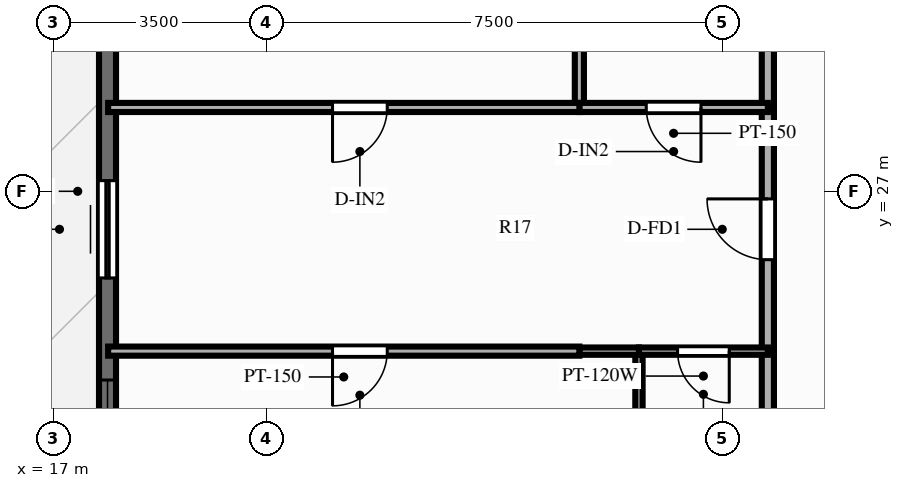
"""IFC4 building model, lengths in metres.
Left out: names, types, materials, properties, quantities, classifications, styles, units other than length and angle.
Written with IfcOpenShell. Run it as: python <this file> out.ifc"""

import sys

from ifc_helpers import new_model, si_unit, direction, frame, frame_2d, origin, place, context, subcontext, project, spatial, rectangle, extrude, source, transform, mapped, element, fill, save


model = new_model("IFC4")
c1 = context("Model", 3, precision=1e-05, world=origin(), true_north=direction((0.0, 1.0)))
c2 = subcontext(c1, "Body", "Model", "MODEL_VIEW")
j1 = project(units=[si_unit("LENGTHUNIT", "METRE"), si_unit("PLANEANGLEUNIT", "RADIAN")], contexts=[c1])
p1 = place(None, origin())
s1 = spatial("IfcSite", under=j1, at=p1, CompositionType="ELEMENT")
p2 = place(p1, origin())
s2 = spatial("IfcBuilding", under=s1, at=p2, CompositionType="ELEMENT")
p3 = place(p2, frame((0.0, 0.0, 172.9)))
s3 = spatial("IfcBuildingStorey", under=s2, at=p3, CompositionType="ELEMENT", Elevation=172.9)
p4 = place(p3, frame((17.89, 11.0, 0.0), z_axis=(0.0, 0.0, 1.0), x_axis=(0.0, 1.0, 0.0)))
e1 = element("IfcWall", 1, at=p4, inside=s3, PredefinedType="SOLIDWALL", context=c2, shape_type="SweptSolid", body=[
    extrude(rectangle(XDim=32.0, YDim=0.28, at=frame_2d((16.0, 0.0))), origin(), (0.0, 0.0, 1.0), 2.79),
])
p5 = place(p4, frame((0.685, 0.0, 0.85)))
e2 = element("IfcOpeningElement", 2, at=p5, cuts=e1, PredefinedType="OPENING", context=c2, shape_type="SweptSolid", body=[
    extrude(rectangle(XDim=1.8, YDim=1.65, at=frame_2d((0.9, 0.825))), frame((0.0, 0.152, 0.0), z_axis=(0.0, -1.0, 0.0), x_axis=(1.0, 0.0, 0.0)), (0.0, 0.0, 1.0), 0.304),
])
p6 = place(p4, frame((3.945, 0.0, 0.85)))
e3 = element("IfcOpeningElement", 3, at=p6, cuts=e1, PredefinedType="OPENING", context=c2, shape_type="SweptSolid", body=[
    extrude(rectangle(XDim=1.8, YDim=1.65, at=frame_2d((0.9, 0.825))), frame((0.0, 0.152, 0.0), z_axis=(0.0, -1.0, 0.0), x_axis=(1.0, 0.0, 0.0)), (0.0, 0.0, 1.0), 0.304),
])
p7 = place(p4, frame((8.051, 0.0, 0.85)))
e4 = element("IfcOpeningElement", 4, at=p7, cuts=e1, PredefinedType="OPENING", context=c2, shape_type="SweptSolid", body=[
    extrude(rectangle(XDim=1.8, YDim=1.65, at=frame_2d((0.9, 0.825))), frame((0.0, 0.152, 0.0), z_axis=(0.0, -1.0, 0.0), x_axis=(1.0, 0.0, 0.0)), (0.0, 0.0, 1.0), 0.304),
])
p8 = place(p4, frame((11.096, 0.0, 0.85)))
e5 = element("IfcOpeningElement", 5, at=p8, cuts=e1, PredefinedType="OPENING", context=c2, shape_type="SweptSolid", body=[
    extrude(rectangle(XDim=1.8, YDim=1.65, at=frame_2d((0.9, 0.825))), frame((0.0, 0.152, 0.0), z_axis=(0.0, -1.0, 0.0), x_axis=(1.0, 0.0, 0.0)), (0.0, 0.0, 1.0), 0.304),
])
p9 = place(p4, frame((14.575, 0.0, 0.0)))
e6 = element("IfcOpeningElement", 6, at=p9, cuts=e1, PredefinedType="OPENING", context=c2, shape_type="SweptSolid", body=[
    extrude(rectangle(XDim=1.6, YDim=2.15, at=frame_2d((0.8, 1.075))), frame((0.0, 0.152, 0.0), z_axis=(0.0, -1.0, 0.0), x_axis=(1.0, 0.0, 0.0)), (0.0, 0.0, 1.0), 0.304),
])
p10 = place(p4, frame((18.479, 0.0, 0.85)))
e7 = element("IfcOpeningElement", 7, at=p10, cuts=e1, PredefinedType="OPENING", context=c2, shape_type="SweptSolid", body=[
    extrude(rectangle(XDim=1.8, YDim=1.65, at=frame_2d((0.9, 0.825))), frame((0.0, 0.152, 0.0), z_axis=(0.0, -1.0, 0.0), x_axis=(1.0, 0.0, 0.0)), (0.0, 0.0, 1.0), 0.304),
])
p11 = place(p4, frame((21.854, 0.0, 0.85)))
e8 = element("IfcOpeningElement", 8, at=p11, cuts=e1, PredefinedType="OPENING", context=c2, shape_type="SweptSolid", body=[
    extrude(rectangle(XDim=1.8, YDim=1.65, at=frame_2d((0.9, 0.825))), frame((0.0, 0.152, 0.0), z_axis=(0.0, -1.0, 0.0), x_axis=(1.0, 0.0, 0.0)), (0.0, 0.0, 1.0), 0.304),
])
p12 = place(p4, frame((25.796, 0.0, 0.85)))
e9 = element("IfcOpeningElement", 9, at=p12, cuts=e1, PredefinedType="OPENING", context=c2, shape_type="SweptSolid", body=[
    extrude(rectangle(XDim=1.5, YDim=1.65, at=frame_2d((0.75, 0.825))), frame((0.0, 0.152, 0.0), z_axis=(0.0, -1.0, 0.0), x_axis=(1.0, 0.0, 0.0)), (0.0, 0.0, 1.0), 0.304),
])
p13 = place(p4, frame((28.906, 0.0, 0.85)))
e10 = element("IfcOpeningElement", 10, at=p13, cuts=e1, PredefinedType="OPENING", context=c2, shape_type="SweptSolid", body=[
    extrude(rectangle(XDim=1.8, YDim=1.65, at=frame_2d((0.9, 0.825))), frame((0.0, 0.152, 0.0), z_axis=(0.0, -1.0, 0.0), x_axis=(1.0, 0.0, 0.0)), (0.0, 0.0, 1.0), 0.304),
])
p14 = place(p3, frame((28.75, 21.621, 0.0), z_axis=(0.0, 0.0, 1.0), x_axis=(0.0, 1.0, 0.0)))
e11 = element("IfcWall", 11, at=p14, inside=s3, PredefinedType="PARTITIONING", context=c2, shape_type="SweptSolid", body=[
    extrude(rectangle(XDim=2.75, YDim=0.2, at=frame_2d((1.375, 0.0))), origin(), (0.0, 0.0, 1.0), 3.69),
])
p15 = place(p3, frame((28.75, 24.371, 0.0), z_axis=(0.0, 0.0, 1.0), x_axis=(0.0, 1.0, 0.0)))
e12 = element("IfcWall", 12, at=p15, inside=s3, PredefinedType="PARTITIONING", context=c2, shape_type="SweptSolid", body=[
    extrude(rectangle(XDim=4.008, YDim=0.2, at=frame_2d((2.004, 0.0))), origin(), (0.0, 0.0, 1.0), 3.69),
])
p16 = place(p15, frame((1.504, 0.0, 0.0)))
e13 = element("IfcOpeningElement", 13, at=p16, cuts=e12, PredefinedType="OPENING", context=c2, shape_type="SweptSolid", body=[
    extrude(rectangle(XDim=1.0, YDim=2.15, at=frame_2d((0.5, 1.075))), frame((0.0, 0.112, 0.0), z_axis=(0.0, -1.0, 0.0), x_axis=(1.0, 0.0, 0.0)), (0.0, 0.0, 1.0), 0.224),
])
p17 = place(p3, frame((28.75, 28.379, 0.0), z_axis=(0.0, 0.0, 1.0), x_axis=(0.0, 1.0, 0.0)))
e14 = element("IfcWall", 14, at=p17, inside=s3, PredefinedType="PARTITIONING", context=c2, shape_type="SweptSolid", body=[
    extrude(rectangle(XDim=4.0, YDim=0.2, at=frame_2d((2.0, 0.0))), origin(), (0.0, 0.0, 1.0), 3.69),
])
p18 = place(p3, frame((26.63, 21.621, 0.0), z_axis=(0.0, 0.0, 1.0), x_axis=(0.0, 1.0, 0.0)))
e15 = element("IfcWall", 15, at=p18, inside=s3, PredefinedType="PARTITIONING", context=c2, shape_type="SweptSolid", body=[
    extrude(rectangle(XDim=2.75, YDim=0.12, at=frame_2d((1.375, 0.0))), origin(), (0.0, 0.0, 1.0), 3.69),
])
p19 = place(p3, frame((25.65, 28.379, 0.0), z_axis=(0.0, 0.0, 1.0), x_axis=(0.0, 1.0, 0.0)))
e16 = element("IfcWall", 16, at=p19, inside=s3, PredefinedType="PARTITIONING", context=c2, shape_type="SweptSolid", body=[
    extrude(rectangle(XDim=4.0, YDim=0.15, at=frame_2d((2.0, 0.0))), origin(), (0.0, 0.0, 1.0), 3.69),
])
p20 = place(p3, frame((28.75, 24.371, 0.0), z_axis=(0.0, 0.0, 1.0), x_axis=(-1.0, 0.0, 0.0)))
e17 = element("IfcWall", 17, at=p20, inside=s3, PredefinedType="PARTITIONING", context=c2, shape_type="SweptSolid", body=[
    extrude(rectangle(XDim=2.12, YDim=0.12, at=frame_2d((1.06, 0.0))), origin(), (0.0, 0.0, 1.0), 3.69),
])
p21 = place(p20, frame((0.635, 0.0, 0.0)))
e18 = element("IfcOpeningElement", 18, at=p21, cuts=e17, PredefinedType="OPENING", context=c2, shape_type="SweptSolid", body=[
    extrude(rectangle(XDim=0.85, YDim=2.05, at=frame_2d((0.425, 1.025))), frame((0.0, 0.072, 0.0), z_axis=(0.0, -1.0, 0.0), x_axis=(1.0, 0.0, 0.0)), (0.0, 0.0, 1.0), 0.144),
])
p22 = place(p3, frame((26.63, 24.371, 0.0), z_axis=(0.0, 0.0, 1.0), x_axis=(-1.0, 0.0, 0.0)))
e19 = element("IfcWall", 19, at=p22, inside=s3, PredefinedType="PARTITIONING", context=c2, shape_type="SweptSolid", body=[
    extrude(rectangle(XDim=0.98, YDim=0.12, at=frame_2d((0.49, 0.0))), origin(), (0.0, 0.0, 1.0), 3.69),
])
p23 = place(p3, frame((25.65, 24.371, 0.0), z_axis=(0.0, 0.0, 1.0), x_axis=(-1.0, 0.0, 0.0)))
e20 = element("IfcWall", 20, at=p23, inside=s3, PredefinedType="PARTITIONING", context=c2, shape_type="SweptSolid", body=[
    extrude(rectangle(XDim=7.75, YDim=0.15, at=frame_2d((3.875, 0.0))), origin(), (0.0, 0.0, 1.0), 3.69),
])
p24 = place(p23, frame((3.16, 0.0, 0.0)))
e21 = element("IfcOpeningElement", 21, at=p24, cuts=e20, PredefinedType="OPENING", context=c2, shape_type="SweptSolid", body=[
    extrude(rectangle(XDim=0.9, YDim=2.1, at=frame_2d((0.45, 1.05))), frame((0.0, 0.087, 0.0), z_axis=(0.0, -1.0, 0.0), x_axis=(1.0, 0.0, 0.0)), (0.0, 0.0, 1.0), 0.174),
])
p25 = place(p3, frame((28.75, 28.379, 0.0), z_axis=(0.0, 0.0, 1.0), x_axis=(-1.0, 0.0, 0.0)))
e22 = element("IfcWall", 22, at=p25, inside=s3, PredefinedType="PARTITIONING", context=c2, shape_type="SweptSolid", body=[
    extrude(rectangle(XDim=3.1, YDim=0.15, at=frame_2d((1.55, 0.0))), origin(), (0.0, 0.0, 1.0), 3.69),
])
p26 = place(p25, frame((1.1, 0.0, 0.0)))
e23 = element("IfcOpeningElement", 23, at=p26, cuts=e22, PredefinedType="OPENING", context=c2, shape_type="SweptSolid", body=[
    extrude(rectangle(XDim=0.9, YDim=2.1, at=frame_2d((0.45, 1.05))), frame((0.0, 0.087, 0.0), z_axis=(0.0, -1.0, 0.0), x_axis=(1.0, 0.0, 0.0)), (0.0, 0.0, 1.0), 0.174),
])
p27 = place(p3, frame((25.65, 28.379, 0.0), z_axis=(0.0, 0.0, 1.0), x_axis=(-1.0, 0.0, 0.0)))
e24 = element("IfcWall", 24, at=p27, inside=s3, PredefinedType="PARTITIONING", context=c2, shape_type="SweptSolid", body=[
    extrude(rectangle(XDim=7.75, YDim=0.15, at=frame_2d((3.875, 0.0))), origin(), (0.0, 0.0, 1.0), 3.69),
])
p28 = place(p27, frame((3.16, 0.0, 0.0)))
e25 = element("IfcOpeningElement", 25, at=p28, cuts=e24, PredefinedType="OPENING", context=c2, shape_type="SweptSolid", body=[
    extrude(rectangle(XDim=0.9, YDim=2.1, at=frame_2d((0.45, 1.05))), frame((0.0, 0.087, 0.0), z_axis=(0.0, -1.0, 0.0), x_axis=(1.0, 0.0, 0.0)), (0.0, 0.0, 1.0), 0.174),
])
m1 = source(origin(), c2, "Body", "SweptSolid", [
    extrude(rectangle(XDim=1.8, YDim=1.65, at=frame_2d((0.9, 0.825))), frame((0.0, 0.03, 0.0), z_axis=(0.0, -1.0, 0.0), x_axis=(1.0, 0.0, 0.0)), (0.0, 0.0, 1.0), 0.06),
])
p29 = place(p8, origin())
e26 = element("IfcWindow", 26, at=p29, inside=s3, PartitioningType="SINGLE_PANEL", PredefinedType="WINDOW", context=c2, shape_type="MappedRepresentation", body=[
    mapped(m1, transform((0.0, 0.0, 0.0), scale=1.0)),
])
fill(e5, e26)
m2 = source(origin(), c2, "Body", "SweptSolid", [
    extrude(rectangle(XDim=1.6, YDim=2.15, at=frame_2d((0.8, 1.075))), frame((0.0, 0.025, 0.0), z_axis=(0.0, -1.0, 0.0), x_axis=(1.0, 0.0, 0.0)), (0.0, 0.0, 1.0), 0.05),
])
p30 = place(p9, origin())
e27 = element("IfcDoor", 27, at=p30, inside=s3, OperationType="SLIDING_TO_LEFT", PredefinedType="DOOR", context=c2, shape_type="MappedRepresentation", body=[
    mapped(m2, transform((0.0, 0.0, 0.0), scale=1.0)),
])
fill(e6, e27)
m3 = source(origin(), c2, "Body", "SweptSolid", [
    extrude(rectangle(XDim=1.0, YDim=2.15, at=frame_2d((0.5, 1.075))), frame((0.0, 0.025, 0.0), z_axis=(0.0, -1.0, 0.0), x_axis=(1.0, 0.0, 0.0)), (0.0, 0.0, 1.0), 0.05),
])
p31 = place(p16, origin())
e28 = element("IfcDoor", 28, at=p31, inside=s3, OperationType="SINGLE_SWING_RIGHT", PredefinedType="DOOR", context=c2, shape_type="MappedRepresentation", body=[
    mapped(m3, transform((0.0, 0.0, 0.0), scale=1.0)),
])
fill(e13, e28)
m4 = source(origin(), c2, "Body", "SweptSolid", [
    extrude(rectangle(XDim=0.85, YDim=2.05, at=frame_2d((0.425, 1.025))), frame((0.0, 0.025, 0.0), z_axis=(0.0, -1.0, 0.0), x_axis=(1.0, 0.0, 0.0)), (0.0, 0.0, 1.0), 0.05),
])
p32 = place(p21, origin())
e29 = element("IfcDoor", 29, at=p32, inside=s3, OperationType="SINGLE_SWING_LEFT", PredefinedType="DOOR", context=c2, shape_type="MappedRepresentation", body=[
    mapped(m4, transform((0.0, 0.0, 0.0), scale=1.0)),
])
fill(e18, e29)
m5 = source(origin(), c2, "Body", "SweptSolid", [
    extrude(rectangle(XDim=0.9, YDim=2.1, at=frame_2d((0.45, 1.05))), frame((0.0, 0.025, 0.0), z_axis=(0.0, -1.0, 0.0), x_axis=(1.0, 0.0, 0.0)), (0.0, 0.0, 1.0), 0.05),
])
p33 = place(p24, origin())
e30 = element("IfcDoor", 30, at=p33, inside=s3, OperationType="SINGLE_SWING_RIGHT", PredefinedType="DOOR", context=c2, shape_type="MappedRepresentation", body=[
    mapped(m5, transform((0.0, 0.0, 0.0), scale=1.0)),
])
fill(e21, e30)
p34 = place(p26, origin())
e31 = element("IfcDoor", 31, at=p34, inside=s3, OperationType="SINGLE_SWING_LEFT", PredefinedType="DOOR", context=c2, shape_type="MappedRepresentation", body=[
    mapped(m5, transform((0.0, 0.0, 0.0), scale=1.0)),
])
fill(e23, e31)
p35 = place(p28, origin())
e32 = element("IfcDoor", 32, at=p35, inside=s3, OperationType="SINGLE_SWING_RIGHT", PredefinedType="DOOR", context=c2, shape_type="MappedRepresentation", body=[
    mapped(m5, transform((0.0, 0.0, 0.0), scale=1.0)),
])
fill(e25, e32)
save(model, sys.argv[1])
